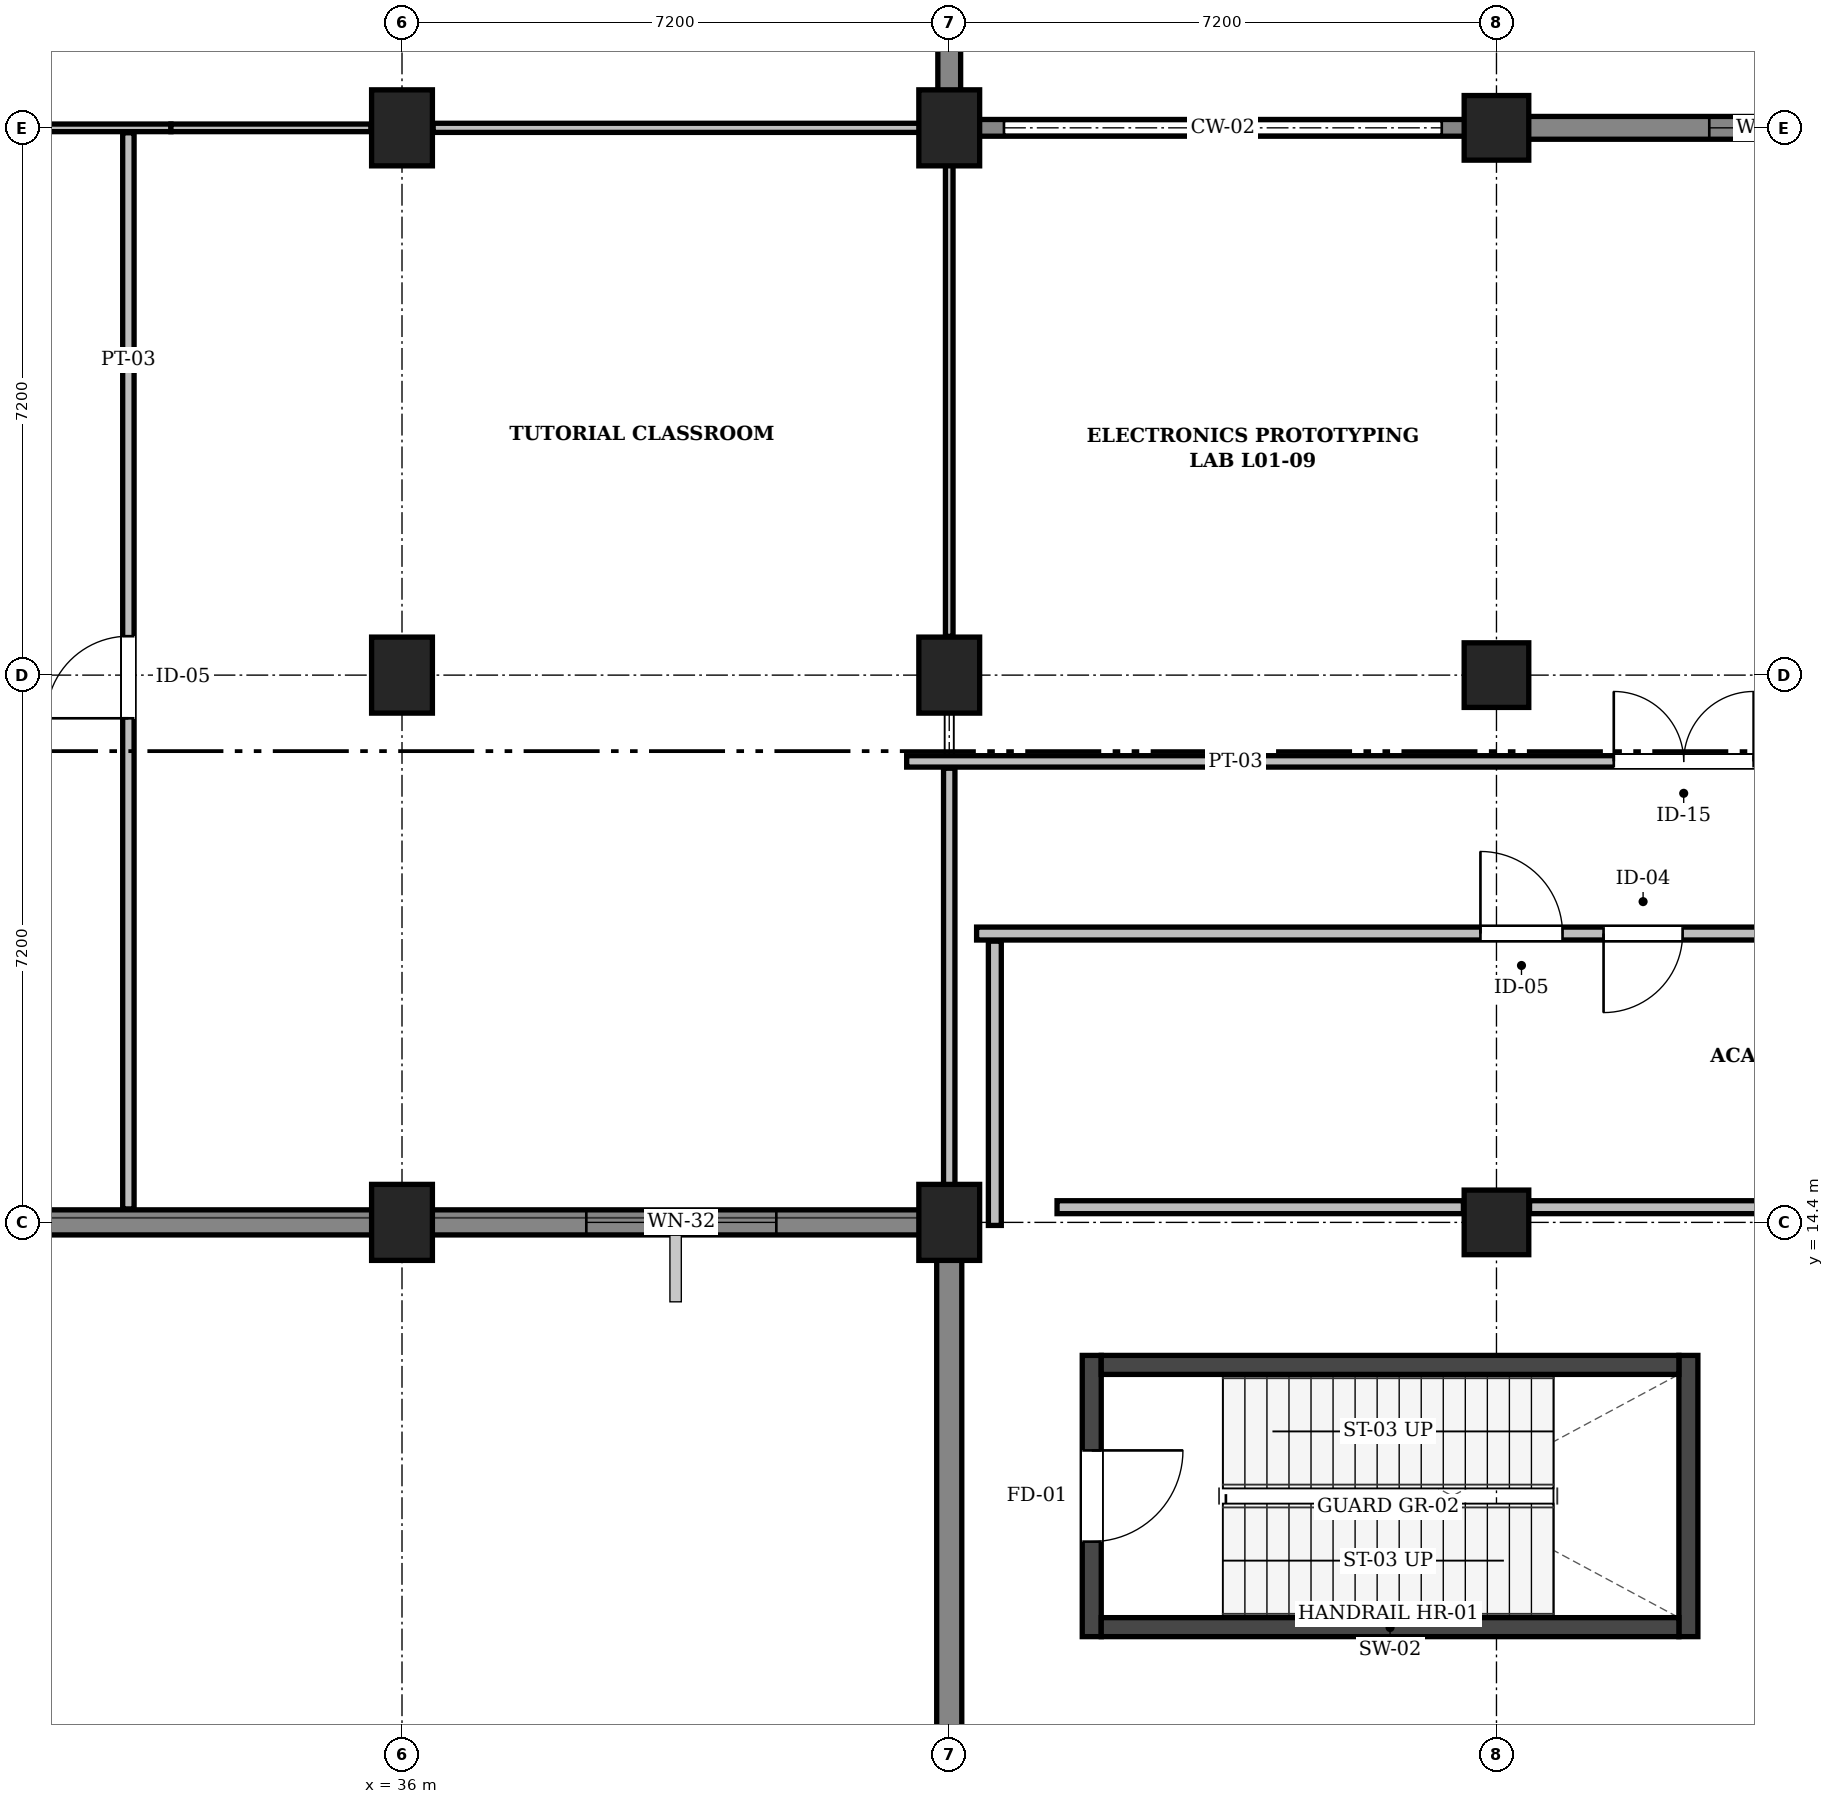
"""IFC4 building model, lengths in metres.
Left out: names, types, materials, properties, quantities, classifications, styles, units other than length and angle.
Written with IfcOpenShell. Run it as: python <this file> out.ifc"""

import sys

from ifc_helpers import new_model, si_unit, direction, frame, frame_2d, origin, origin_2d, place, context, subcontext, project, spatial, rectangle, extrude, element, fill, save


model = new_model("IFC4")
c1 = context("Model", 3, precision=1e-05, world=origin(), true_north=direction((0.0, 1.0)))
c2 = subcontext(c1, "Body", "Model", "MODEL_VIEW")
j1 = project(units=[si_unit("LENGTHUNIT", "METRE"), si_unit("PLANEANGLEUNIT", "RADIAN")], contexts=[c1])
p1 = place(None, origin())
s1 = spatial("IfcSite", under=j1, at=p1, CompositionType="ELEMENT")
p2 = place(p1, origin())
s2 = spatial("IfcBuilding", under=s1, at=p2, CompositionType="ELEMENT")
p3 = place(p2, frame((0.0, 0.0, 4.8)))
s3 = spatial("IfcBuildingStorey", under=s2, at=p3, CompositionType="ELEMENT", Elevation=4.8)
for number, where, z_axis, x_axis in (
    (1, (36.0, 14.4, 0.0), (0.0, 0.0, 1.0), (1.0, 0.0, 0.0)),
    (2, (36.0, 21.6, 0.0), (0.0, 0.0, 1.0), (1.0, 0.0, 0.0)),
    (3, (36.0, 28.8, 0.0), (0.0, 0.0, 1.0), (1.0, 0.0, 0.0)),
    (4, (43.2, 14.4, 0.0), (0.0, 0.0, 1.0), (1.0, 0.0, 0.0)),
    (5, (43.2, 21.6, 0.0), (0.0, 0.0, 1.0), (1.0, 0.0, 0.0)),
    (6, (43.2, 28.8, 0.0), (0.0, 0.0, 1.0), (1.0, 0.0, 0.0)),
):
    element("IfcColumn", number, at=place(p3, frame(where, z_axis=z_axis, x_axis=x_axis)), inside=s3, PredefinedType="COLUMN", context=c2, shape_type="SweptSolid", body=[
        extrude(rectangle(XDim=0.8, YDim=1.0, at=origin_2d()), origin(), (0.0, 0.0, 1.0), 4.8),
    ])
for number, where, z_axis, x_axis in (
    (7, (50.4, 14.4, 0.0), (0.0, 0.0, 1.0), (1.0, 0.0, 0.0)),
    (8, (50.4, 21.6, 0.0), (0.0, 0.0, 1.0), (1.0, 0.0, 0.0)),
    (9, (50.4, 28.8, 0.0), (0.0, 0.0, 1.0), (1.0, 0.0, 0.0)),
):
    element("IfcColumn", number, at=place(p3, frame(where, z_axis=z_axis, x_axis=x_axis)), inside=s3, PredefinedType="COLUMN", context=c2, shape_type="SweptSolid", body=[
        extrude(rectangle(XDim=0.85, YDim=0.85, at=origin_2d()), origin(), (0.0, 0.0, 1.0), 4.8),
    ])
p4 = place(p3, frame((43.2, 7.2, 0.0), z_axis=(0.0, 0.0, 1.0), x_axis=(0.0, 1.0, 0.0)))
e10 = element("IfcWall", 10, at=p4, inside=s3, PredefinedType="SOLIDWALL", context=c2, shape_type="SweptSolid", body=[
    extrude(rectangle(XDim=7.034, YDim=0.33, at=frame_2d((3.517, 0.0))), origin(), (0.0, 0.0, 1.0), 4.52),
])
p5 = place(p3, frame((43.35, 14.4, 0.0), z_axis=(0.0, 0.0, 1.0), x_axis=(-1.0, 0.0, 0.0)))
e11 = element("IfcWall", 11, at=p5, inside=s3, PredefinedType="SOLIDWALL", context=c2, shape_type="SweptSolid", body=[
    extrude(rectangle(XDim=7.35, YDim=0.33, at=frame_2d((3.675, 0.0))), origin(), (0.0, 0.0, 1.0), 4.52),
])
p6 = place(p5, frame((2.425, 0.0, 0.95)))
e12 = element("IfcOpeningElement", 12, at=p6, cuts=e11, PredefinedType="OPENING", context=c2, shape_type="SweptSolid", body=[
    extrude(rectangle(XDim=2.5, YDim=1.8, at=frame_2d((1.25, 0.9))), frame((0.0, 0.177, 0.0), z_axis=(0.0, -1.0, 0.0), x_axis=(1.0, 0.0, 0.0)), (0.0, 0.0, 1.0), 0.354),
])
p7 = place(p3, frame((36.0, 14.4, 0.0), z_axis=(0.0, 0.0, 1.0), x_axis=(-1.0, 0.0, 0.0)))
e13 = element("IfcWall", 13, at=p7, inside=s3, PredefinedType="SOLIDWALL", context=c2, shape_type="SweptSolid", body=[
    extrude(rectangle(XDim=7.2, YDim=0.33, at=frame_2d((3.6, 0.0))), origin(), (0.0, 0.0, 1.0), 4.52),
])
p8 = place(p3, frame((43.2, 36.0, 0.0), z_axis=(0.0, 0.0, 1.0), x_axis=(0.0, -1.0, 0.0)))
e14 = element("IfcWall", 14, at=p8, inside=s3, PredefinedType="SOLIDWALL", context=c2, shape_type="SweptSolid", body=[
    extrude(rectangle(XDim=7.034, YDim=0.3, at=frame_2d((3.517, 0.0))), origin(), (0.0, 0.0, 1.0), 4.52),
])
p9 = place(p8, frame((4.452, 0.0, 0.95)))
e15 = element("IfcOpeningElement", 15, at=p9, cuts=e14, PredefinedType="OPENING", context=c2, shape_type="SweptSolid", body=[
    extrude(rectangle(XDim=1.45, YDim=1.3, at=frame_2d((0.725, 0.65))), frame((0.0, 0.162, 0.0), z_axis=(0.0, -1.0, 0.0), x_axis=(1.0, 0.0, 0.0)), (0.0, 0.0, 1.0), 0.324),
])
p10 = place(p3, frame((43.05, 28.8, 0.0), z_axis=(0.0, 0.0, 1.0), x_axis=(1.0, 0.0, 0.0)))
e16 = element("IfcWall", 16, at=p10, inside=s3, PredefinedType="SOLIDWALL", context=c2, shape_type="SweptSolid", body=[
    extrude(rectangle(XDim=7.35, YDim=0.22, at=frame_2d((3.675, 0.0))), origin(), (0.0, 0.0, 1.0), 1.24),
])
p11 = place(p3, frame((50.4, 28.8, 0.0), z_axis=(0.0, 0.0, 1.0), x_axis=(1.0, 0.0, 0.0)))
e17 = element("IfcWall", 17, at=p11, inside=s3, PredefinedType="SOLIDWALL", context=c2, shape_type="SweptSolid", body=[
    extrude(rectangle(XDim=7.2, YDim=0.3, at=frame_2d((3.6, 0.0))), origin(), (0.0, 0.0, 1.0), 4.52),
])
p12 = place(p11, frame((2.8, 0.0, 0.95)))
e18 = element("IfcOpeningElement", 18, at=p12, cuts=e17, PredefinedType="OPENING", context=c2, shape_type="SweptSolid", body=[
    extrude(rectangle(XDim=1.6, YDim=1.3, at=frame_2d((0.8, 0.65))), frame((0.0, 0.162, 0.0), z_axis=(0.0, -1.0, 0.0), x_axis=(1.0, 0.0, 0.0)), (0.0, 0.0, 1.0), 0.324),
])
p13 = place(p3, frame((45.075, 8.95, 0.0), z_axis=(0.0, 0.0, 1.0), x_axis=(0.0, 1.0, 0.0)))
e19 = element("IfcWall", 19, at=p13, inside=s3, PredefinedType="SHEAR", context=c2, shape_type="SweptSolid", body=[
    extrude(rectangle(XDim=3.7, YDim=0.25, at=frame_2d((1.85, 0.0))), origin(), (0.0, 0.0, 1.0), 4.55),
])
p14 = place(p13, frame((1.25, 0.0, 0.0)))
e20 = element("IfcOpeningElement", 20, at=p14, cuts=e19, PredefinedType="OPENING", context=c2, shape_type="SweptSolid", body=[
    extrude(rectangle(XDim=1.2, YDim=2.15, at=frame_2d((0.6, 1.075))), frame((0.0, 0.137, 0.0), z_axis=(0.0, -1.0, 0.0), x_axis=(1.0, 0.0, 0.0)), (0.0, 0.0, 1.0), 0.274),
])
p15 = place(p3, frame((52.925, 8.95, 0.0), z_axis=(0.0, 0.0, 1.0), x_axis=(0.0, 1.0, 0.0)))
e21 = element("IfcWall", 21, at=p15, inside=s3, PredefinedType="SHEAR", context=c2, shape_type="SweptSolid", body=[
    extrude(rectangle(XDim=3.7, YDim=0.25, at=frame_2d((1.85, 0.0))), origin(), (0.0, 0.0, 1.0), 4.55),
])
for number, where, z_axis, x_axis in (
    (22, (45.2, 9.075, 0.0), (0.0, 0.0, 1.0), (1.0, 0.0, 0.0)),
    (23, (45.2, 12.525, 0.0), (0.0, 0.0, 1.0), (1.0, 0.0, 0.0)),
):
    element("IfcWall", number, at=place(p3, frame(where, z_axis=z_axis, x_axis=x_axis)), inside=s3, PredefinedType="SHEAR", context=c2, shape_type="SweptSolid", body=[
        extrude(rectangle(XDim=7.6, YDim=0.25, at=frame_2d((3.8, 0.0))), origin(), (0.0, 0.0, 1.0), 4.55),
    ])
p16 = place(p3, frame((43.56, 18.2, 0.0), z_axis=(0.0, 0.0, 1.0), x_axis=(1.0, 0.0, 0.0)))
e24 = element("IfcWall", 24, at=p16, inside=s3, PredefinedType="PARTITIONING", context=c2, shape_type="SweptSolid", body=[
    extrude(rectangle(XDim=17.538, YDim=0.17, at=frame_2d((8.769, 0.0))), origin(), (0.0, 0.0, 1.0), 4.46),
])
p17 = place(p16, frame((8.249, 0.0, 0.0)))
e25 = element("IfcOpeningElement", 25, at=p17, cuts=e24, PredefinedType="OPENING", context=c2, shape_type="SweptSolid", body=[
    extrude(rectangle(XDim=1.04, YDim=2.18, at=frame_2d((0.52, 1.09))), frame((0.0, 0.097, 0.0), z_axis=(0.0, -1.0, 0.0), x_axis=(1.0, 0.0, 0.0)), (0.0, 0.0, 1.0), 0.194),
])
p18 = place(p16, frame((6.629, 0.0, 0.0)))
e26 = element("IfcOpeningElement", 26, at=p18, cuts=e24, PredefinedType="OPENING", context=c2, shape_type="SweptSolid", body=[
    extrude(rectangle(XDim=1.08, YDim=2.2, at=frame_2d((0.54, 1.1))), frame((0.0, 0.097, 0.0), z_axis=(0.0, -1.0, 0.0), x_axis=(1.0, 0.0, 0.0)), (0.0, 0.0, 1.0), 0.194),
])
p19 = place(p3, frame((50.835, 14.6, 0.0), z_axis=(0.0, 0.0, 1.0), x_axis=(1.0, 0.0, 0.0)))
e27 = element("IfcWall", 27, at=p19, inside=s3, PredefinedType="PARTITIONING", context=c2, shape_type="SweptSolid", body=[
    extrude(rectangle(XDim=6.305, YDim=0.17, at=frame_2d((3.152, 0.0))), origin(), (0.0, 0.0, 1.0), 3.9),
])
p20 = place(p3, frame((44.618, 14.6, 0.0), z_axis=(0.0, 0.0, 1.0), x_axis=(1.0, 0.0, 0.0)))
e28 = element("IfcWall", 28, at=p20, inside=s3, PredefinedType="PARTITIONING", context=c2, shape_type="SweptSolid", body=[
    extrude(rectangle(XDim=5.347, YDim=0.17, at=frame_2d((2.673, 0.0))), origin(), (0.0, 0.0, 1.0), 3.9),
])
p21 = place(p3, frame((43.8, 14.36, 0.0), z_axis=(0.0, 0.0, 1.0), x_axis=(0.0, 1.0, 0.0)))
e29 = element("IfcWall", 29, at=p21, inside=s3, PredefinedType="PARTITIONING", context=c2, shape_type="SweptSolid", body=[
    extrude(rectangle(XDim=3.74, YDim=0.17, at=frame_2d((1.87, 0.0))), origin(), (0.0, 0.0, 1.0), 4.46),
])
p22 = place(p3, frame((29.21, 28.8, 0.0), z_axis=(0.0, 0.0, 1.0), x_axis=(1.0, 0.0, 0.0)))
e30 = element("IfcWall", 30, at=p22, inside=s3, PredefinedType="PARTITIONING", context=c2, shape_type="SweptSolid", body=[
    extrude(rectangle(XDim=3.75, YDim=0.1, at=frame_2d((1.875, 0.0))), origin(), (0.0, 0.0, 1.0), 3.9),
])
p23 = place(p3, frame((36.41, 28.8, 0.0), z_axis=(0.0, 0.0, 1.0), x_axis=(1.0, 0.0, 0.0)))
e31 = element("IfcWall", 31, at=p23, inside=s3, PredefinedType="PARTITIONING", context=c2, shape_type="SweptSolid", body=[
    extrude(rectangle(XDim=6.628, YDim=0.12, at=frame_2d((3.314, 0.0))), origin(), (0.0, 0.0, 1.0), 3.9),
])
p24 = place(p3, frame((32.96, 28.8, 0.0), z_axis=(0.0, 0.0, 1.0), x_axis=(1.0, 0.0, 0.0)))
e32 = element("IfcWall", 32, at=p24, inside=s3, PredefinedType="PARTITIONING", context=c2, shape_type="SweptSolid", body=[
    extrude(rectangle(XDim=2.63, YDim=0.1, at=frame_2d((1.315, 0.0))), origin(), (0.0, 0.0, 1.0), 3.9),
])
p25 = place(p3, frame((42.64, 20.465, 0.0), z_axis=(0.0, 0.0, 1.0), x_axis=(1.0, 0.0, 0.0)))
e33 = element("IfcWall", 33, at=p25, inside=s3, PredefinedType="PARTITIONING", context=c2, shape_type="SweptSolid", body=[
    extrude(rectangle(XDim=18.447, YDim=0.15, at=frame_2d((9.223, 0.0))), origin(), (0.0, 0.0, 1.0), 4.46),
])
p26 = place(p25, frame((9.303, 0.0, 0.0)))
e34 = element("IfcOpeningElement", 34, at=p26, cuts=e33, PredefinedType="OPENING", context=c2, shape_type="SweptSolid", body=[
    extrude(rectangle(XDim=1.84, YDim=2.3, at=frame_2d((0.92, 1.15))), frame((0.0, 0.087, 0.0), z_axis=(0.0, -1.0, 0.0), x_axis=(1.0, 0.0, 0.0)), (0.0, 0.0, 1.0), 0.174),
])
p27 = place(p3, frame((43.2, 14.577, 0.0), z_axis=(0.0, 0.0, 1.0), x_axis=(0.0, 1.0, 0.0)))
e35 = element("IfcWall", 35, at=p27, inside=s3, PredefinedType="PARTITIONING", context=c2, shape_type="SweptSolid", body=[
    extrude(rectangle(XDim=5.798, YDim=0.15, at=frame_2d((2.899, 0.0))), origin(), (0.0, 0.0, 1.0), 4.08),
])
p28 = place(p3, frame((43.2, 22.11, 0.0), z_axis=(0.0, 0.0, 1.0), x_axis=(0.0, 1.0, 0.0)))
e36 = element("IfcWall", 36, at=p28, inside=s3, PredefinedType="PARTITIONING", context=c2, shape_type="SweptSolid", body=[
    extrude(rectangle(XDim=6.568, YDim=0.1, at=frame_2d((3.284, 0.0))), origin(), (0.0, 0.0, 1.0), 4.08),
])
p29 = place(p3, frame((32.4, 14.577, 0.0), z_axis=(0.0, 0.0, 1.0), x_axis=(0.0, 1.0, 0.0)))
e37 = element("IfcWall", 37, at=p29, inside=s3, PredefinedType="PARTITIONING", context=c2, shape_type="SweptSolid", body=[
    extrude(rectangle(XDim=14.158, YDim=0.15, at=frame_2d((7.079, 0.0))), origin(), (0.0, 0.0, 1.0), 4.46),
])
p30 = place(p29, frame((6.455, 0.0, 0.0)))
e38 = element("IfcOpeningElement", 38, at=p30, cuts=e37, PredefinedType="OPENING", context=c2, shape_type="SweptSolid", body=[
    extrude(rectangle(XDim=1.08, YDim=2.2, at=frame_2d((0.54, 1.1))), frame((0.0, 0.087, 0.0), z_axis=(0.0, -1.0, 0.0), x_axis=(1.0, 0.0, 0.0)), (0.0, 0.0, 1.0), 0.174),
])
p31 = place(p6, origin())
e39 = element("IfcWindow", 39, at=p31, inside=s3, PartitioningType="SINGLE_PANEL", PredefinedType="WINDOW", context=c2, shape_type="SweptSolid", body=[
    extrude(rectangle(XDim=2.5, YDim=1.8, at=frame_2d((1.25, 0.9))), frame((0.0, 0.03, 0.0), z_axis=(0.0, -1.0, 0.0), x_axis=(1.0, 0.0, 0.0)), (0.0, 0.0, 1.0), 0.06),
])
fill(e12, e39)
p32 = place(p12, origin())
e40 = element("IfcWindow", 40, at=p32, inside=s3, PartitioningType="SINGLE_PANEL", PredefinedType="WINDOW", context=c2, shape_type="SweptSolid", body=[
    extrude(rectangle(XDim=1.6, YDim=1.3, at=frame_2d((0.8, 0.65))), frame((0.0, 0.03, 0.0), z_axis=(0.0, -1.0, 0.0), x_axis=(1.0, 0.0, 0.0)), (0.0, 0.0, 1.0), 0.06),
])
fill(e18, e40)
p33 = place(p14, frame((1.2, 0.0, 0.0), z_axis=(0.0, 0.0, 1.0), x_axis=(-1.0, 0.0, 0.0)))
e41 = element("IfcDoor", 41, at=p33, inside=s3, OperationType="SINGLE_SWING_LEFT", PredefinedType="DOOR", context=c2, shape_type="SweptSolid", body=[
    extrude(rectangle(XDim=1.2, YDim=2.15, at=frame_2d((0.6, 1.075))), frame((0.0, 0.025, 0.0), z_axis=(0.0, -1.0, 0.0), x_axis=(1.0, 0.0, 0.0)), (0.0, 0.0, 1.0), 0.05),
])
fill(e20, e41)
p34 = place(p26, origin())
e42 = element("IfcDoor", 42, at=p34, inside=s3, OperationType="DOUBLE_DOOR_SINGLE_SWING", PredefinedType="DOOR", context=c2, shape_type="SweptSolid", body=[
    extrude(rectangle(XDim=1.84, YDim=2.3, at=frame_2d((0.92, 1.15))), frame((0.0, 0.025, 0.0), z_axis=(0.0, -1.0, 0.0), x_axis=(1.0, 0.0, 0.0)), (0.0, 0.0, 1.0), 0.05),
])
fill(e34, e42)
p35 = place(p30, origin())
e43 = element("IfcDoor", 43, at=p35, inside=s3, OperationType="SINGLE_SWING_LEFT", PredefinedType="DOOR", context=c2, shape_type="SweptSolid", body=[
    extrude(rectangle(XDim=1.08, YDim=2.2, at=frame_2d((0.54, 1.1))), frame((0.0, 0.025, 0.0), z_axis=(0.0, -1.0, 0.0), x_axis=(1.0, 0.0, 0.0)), (0.0, 0.0, 1.0), 0.05),
])
fill(e38, e43)
p36 = place(p17, frame((1.04, 0.0, 0.0), z_axis=(0.0, 0.0, 1.0), x_axis=(-1.0, 0.0, 0.0)))
e44 = element("IfcDoor", 44, at=p36, inside=s3, OperationType="SINGLE_SWING_RIGHT", PredefinedType="DOOR", context=c2, shape_type="SweptSolid", body=[
    extrude(rectangle(XDim=1.04, YDim=2.18, at=frame_2d((0.52, 1.09))), frame((0.0, 0.025, 0.0), z_axis=(0.0, -1.0, 0.0), x_axis=(1.0, 0.0, 0.0)), (0.0, 0.0, 1.0), 0.05),
])
fill(e25, e44)
p37 = place(p18, origin())
e45 = element("IfcDoor", 45, at=p37, inside=s3, OperationType="SINGLE_SWING_LEFT", PredefinedType="DOOR", context=c2, shape_type="SweptSolid", body=[
    extrude(rectangle(XDim=1.08, YDim=2.2, at=frame_2d((0.54, 1.1))), frame((0.0, 0.025, 0.0), z_axis=(0.0, -1.0, 0.0), x_axis=(1.0, 0.0, 0.0)), (0.0, 0.0, 1.0), 0.05),
])
fill(e26, e45)
save(model, sys.argv[1])
